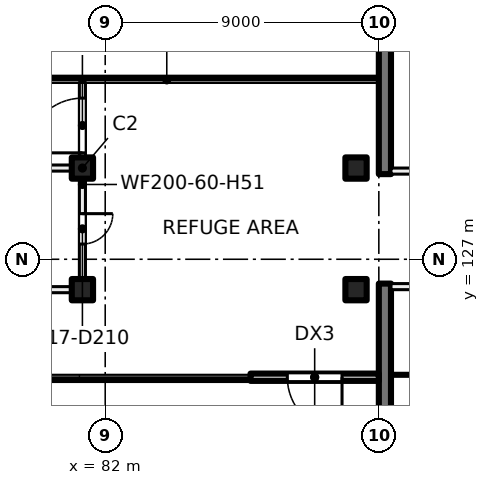
"""IFC4 building model, lengths in metres.
Left out: names, types, materials, properties, quantities, classifications, styles, units other than length and angle.
Written with IfcOpenShell. Run it as: python <this file> out.ifc"""

import sys

from ifc_helpers import new_model, si_unit, direction, frame, frame_2d, origin, origin_2d, place, context, subcontext, project, spatial, rectangle, extrude, element, fill, save


model = new_model("IFC4")
c1 = context("Model", 3, precision=1e-05, world=origin(), true_north=direction((0.0, 1.0)))
c2 = subcontext(c1, "Body", "Model", "MODEL_VIEW")
j1 = project(units=[si_unit("LENGTHUNIT", "METRE"), si_unit("PLANEANGLEUNIT", "RADIAN")], contexts=[c1])
p1 = place(None, origin())
s1 = spatial("IfcSite", under=j1, at=p1, CompositionType="ELEMENT")
p2 = place(p1, origin())
s2 = spatial("IfcBuilding", under=s1, at=p2, CompositionType="ELEMENT")
p3 = place(p2, frame((0.0, 0.0, 75.5)))
s3 = spatial("IfcBuildingStorey", under=s2, at=p3, CompositionType="ELEMENT", Elevation=75.5)
for number, where, z_axis, x_axis in (
    (1, (81.25, 130.0, 0.0), (0.0, 0.0, 1.0), (1.0, 0.0, 0.0)),
    (2, (90.25, 130.0, 0.0), (0.0, 0.0, 1.0), (1.0, 0.0, 0.0)),
    (3, (81.25, 126.0, 0.0), (0.0, 0.0, 1.0), (1.0, 0.0, 0.0)),
    (4, (90.25, 126.0, 0.0), (0.0, 0.0, 1.0), (1.0, 0.0, 0.0)),
):
    element("IfcColumn", number, at=place(p3, frame(where, z_axis=z_axis, x_axis=x_axis)), inside=s3, PredefinedType="COLUMN", context=c2, shape_type="SweptSolid", body=[
        extrude(rectangle(XDim=0.7, YDim=0.7, at=origin_2d()), origin(), (0.0, 0.0, 1.0), 5.5),
    ])
for number, where, z_axis, x_axis in (
    (5, (91.2, 138.4, 0.0), (0.0, 0.0, 1.0), (0.0, -1.0, 0.0)),
    (6, (91.2, 126.2, 0.0), (0.0, 0.0, 1.0), (0.0, -1.0, 0.0)),
):
    element("IfcWall", number, at=place(p3, frame(where, z_axis=z_axis, x_axis=x_axis)), inside=s3, PredefinedType="SHEAR", context=c2, shape_type="SweptSolid", body=[
        extrude(rectangle(XDim=8.6, YDim=0.4, at=frame_2d((4.3, 0.0))), origin(), (0.0, 0.0, 1.0), 5.5),
    ])
p4 = place(p3, frame((91.0, 123.12, 0.0), z_axis=(0.0, 0.0, 1.0), x_axis=(-1.0, 0.0, 0.0)))
e7 = element("IfcWall", 7, at=p4, inside=s3, PredefinedType="SOLIDWALL", context=c2, shape_type="SweptSolid", body=[
    extrude(rectangle(XDim=4.221, YDim=0.24, at=frame_2d((2.11, 0.0))), origin(), (0.0, 0.0, 1.0), 5.125),
])
p5 = place(p4, frame((1.21, 0.0, 0.0)))
e8 = element("IfcOpeningElement", 8, at=p5, cuts=e7, PredefinedType="OPENING", context=c2, shape_type="SweptSolid", body=[
    extrude(rectangle(XDim=1.8, YDim=2.4, at=frame_2d((0.9, 1.2))), frame((0.0, 0.13, 0.0), z_axis=(0.0, -1.0, 0.0), x_axis=(1.0, 0.0, 0.0)), (0.0, 0.0, 1.0), 0.26),
])
p6 = place(p3, frame((95.2, 126.1, 0.0), z_axis=(0.0, 0.0, 1.0), x_axis=(-1.0, 0.0, 0.0)))
e9 = element("IfcWall", 9, at=p6, inside=s3, PredefinedType="PARTITIONING", context=c2, shape_type="SweptSolid", body=[
    extrude(rectangle(XDim=3.8, YDim=0.2, at=frame_2d((1.9, 0.0))), origin(), (0.0, 0.0, 1.0), 5.125),
])
p7 = place(p6, frame((0.3, 0.0, 0.0)))
e10 = element("IfcOpeningElement", 10, at=p7, cuts=e9, PredefinedType="OPENING", context=c2, shape_type="SweptSolid", body=[
    extrude(rectangle(XDim=1.2, YDim=2.1, at=frame_2d((0.6, 1.05))), frame((0.0, 0.11, 0.0), z_axis=(0.0, -1.0, 0.0), x_axis=(1.0, 0.0, 0.0)), (0.0, 0.0, 1.0), 0.22),
])
p8 = place(p3, frame((93.35, 123.2, 0.0), z_axis=(0.0, 0.0, 1.0), x_axis=(-1.0, 0.0, 0.0)))
e11 = element("IfcWall", 11, at=p8, inside=s3, PredefinedType="PARTITIONING", context=c2, shape_type="SweptSolid", body=[
    extrude(rectangle(XDim=1.95, YDim=0.1, at=frame_2d((0.975, 0.0))), origin(), (0.0, 0.0, 1.0), 5.125),
])
p9 = place(p3, frame((91.4, 129.9, 0.0), z_axis=(0.0, 0.0, 1.0), x_axis=(1.0, 0.0, 0.0)))
e12 = element("IfcWall", 12, at=p9, inside=s3, PredefinedType="PARTITIONING", context=c2, shape_type="SweptSolid", body=[
    extrude(rectangle(XDim=3.8, YDim=0.2, at=frame_2d((1.9, 0.0))), origin(), (0.0, 0.0, 1.0), 5.125),
])
p10 = place(p9, frame((2.3, 0.0, 0.0)))
e13 = element("IfcOpeningElement", 13, at=p10, cuts=e12, PredefinedType="OPENING", context=c2, shape_type="SweptSolid", body=[
    extrude(rectangle(XDim=1.2, YDim=2.1, at=frame_2d((0.6, 1.05))), frame((0.0, 0.11, 0.0), z_axis=(0.0, -1.0, 0.0), x_axis=(1.0, 0.0, 0.0)), (0.0, 0.0, 1.0), 0.22),
])
p11 = place(p3, frame((63.25, 126.0, 0.0), z_axis=(0.0, 0.0, 1.0), x_axis=(1.0, 0.0, 0.0)))
e14 = element("IfcWall", 14, at=p11, inside=s3, PredefinedType="PARTITIONING", context=c2, shape_type="SweptSolid", body=[
    extrude(rectangle(XDim=18.1, YDim=0.2, at=frame_2d((9.05, 0.0))), origin(), (0.0, 0.0, 1.0), 5.125),
])
p12 = place(p11, frame((4.0, 0.0, 0.0)))
e15 = element("IfcOpeningElement", 15, at=p12, cuts=e14, PredefinedType="OPENING", context=c2, shape_type="SweptSolid", body=[
    extrude(rectangle(XDim=1.0, YDim=2.1, at=frame_2d((0.5, 1.05))), frame((0.0, 0.11, 0.0), z_axis=(0.0, -1.0, 0.0), x_axis=(1.0, 0.0, 0.0)), (0.0, 0.0, 1.0), 0.22),
])
p13 = place(p11, frame((13.0, 0.0, 0.0)))
e16 = element("IfcOpeningElement", 16, at=p13, cuts=e14, PredefinedType="OPENING", context=c2, shape_type="SweptSolid", body=[
    extrude(rectangle(XDim=1.0, YDim=2.1, at=frame_2d((0.5, 1.05))), frame((0.0, 0.11, 0.0), z_axis=(0.0, -1.0, 0.0), x_axis=(1.0, 0.0, 0.0)), (0.0, 0.0, 1.0), 0.22),
])
p14 = place(p3, frame((72.4, 130.0, 0.0), z_axis=(0.0, 0.0, 1.0), x_axis=(1.0, 0.0, 0.0)))
e17 = element("IfcWall", 17, at=p14, inside=s3, PredefinedType="PARTITIONING", context=c2, shape_type="SweptSolid", body=[
    extrude(rectangle(XDim=8.75, YDim=0.2, at=frame_2d((4.375, 0.0))), origin(), (0.0, 0.0, 1.0), 5.125),
])
p15 = place(p3, frame((81.25, 126.1, 0.0), z_axis=(0.0, 0.0, 1.0), x_axis=(0.0, 1.0, 0.0)))
e18 = element("IfcWall", 18, at=p15, inside=s3, PredefinedType="PARTITIONING", context=c2, shape_type="SweptSolid", body=[
    extrude(rectangle(XDim=6.72, YDim=0.2, at=frame_2d((3.36, 0.0))), origin(), (0.0, 0.0, 1.0), 5.125),
])
p16 = place(p15, frame((1.4, 0.0, 0.0)))
e19 = element("IfcOpeningElement", 19, at=p16, cuts=e18, PredefinedType="OPENING", context=c2, shape_type="SweptSolid", body=[
    extrude(rectangle(XDim=1.0, YDim=2.1, at=frame_2d((0.5, 1.05))), frame((0.0, 0.11, 0.0), z_axis=(0.0, -1.0, 0.0), x_axis=(1.0, 0.0, 0.0)), (0.0, 0.0, 1.0), 0.22),
])
p17 = place(p15, frame((4.4, 0.0, 0.0)))
e20 = element("IfcOpeningElement", 20, at=p17, cuts=e18, PredefinedType="OPENING", context=c2, shape_type="SweptSolid", body=[
    extrude(rectangle(XDim=1.8, YDim=2.1, at=frame_2d((0.9, 1.05))), frame((0.0, 0.11, 0.0), z_axis=(0.0, -1.0, 0.0), x_axis=(1.0, 0.0, 0.0)), (0.0, 0.0, 1.0), 0.22),
])
p18 = place(p5, origin())
e21 = element("IfcDoor", 21, at=p18, inside=s3, OperationType="DOUBLE_DOOR_SINGLE_SWING", PredefinedType="DOOR", context=c2, shape_type="SweptSolid", body=[
    extrude(rectangle(XDim=1.8, YDim=2.4, at=frame_2d((0.9, 1.2))), frame((0.0, 0.025, 0.0), z_axis=(0.0, -1.0, 0.0), x_axis=(1.0, 0.0, 0.0)), (0.0, 0.0, 1.0), 0.05),
])
fill(e8, e21)
p19 = place(p16, origin())
e22 = element("IfcDoor", 22, at=p19, inside=s3, OperationType="SINGLE_SWING_RIGHT", PredefinedType="DOOR", context=c2, shape_type="SweptSolid", body=[
    extrude(rectangle(XDim=1.0, YDim=2.1, at=frame_2d((0.5, 1.05))), frame((0.0, 0.025, 0.0), z_axis=(0.0, -1.0, 0.0), x_axis=(1.0, 0.0, 0.0)), (0.0, 0.0, 1.0), 0.05),
])
fill(e19, e22)
p20 = place(p17, origin())
e23 = element("IfcDoor", 23, at=p20, inside=s3, OperationType="DOUBLE_DOOR_SINGLE_SWING", PredefinedType="DOOR", context=c2, shape_type="SweptSolid", body=[
    extrude(rectangle(XDim=1.8, YDim=2.1, at=frame_2d((0.9, 1.05))), frame((0.0, 0.025, 0.0), z_axis=(0.0, -1.0, 0.0), x_axis=(1.0, 0.0, 0.0)), (0.0, 0.0, 1.0), 0.05),
])
fill(e20, e23)
save(model, sys.argv[1])
